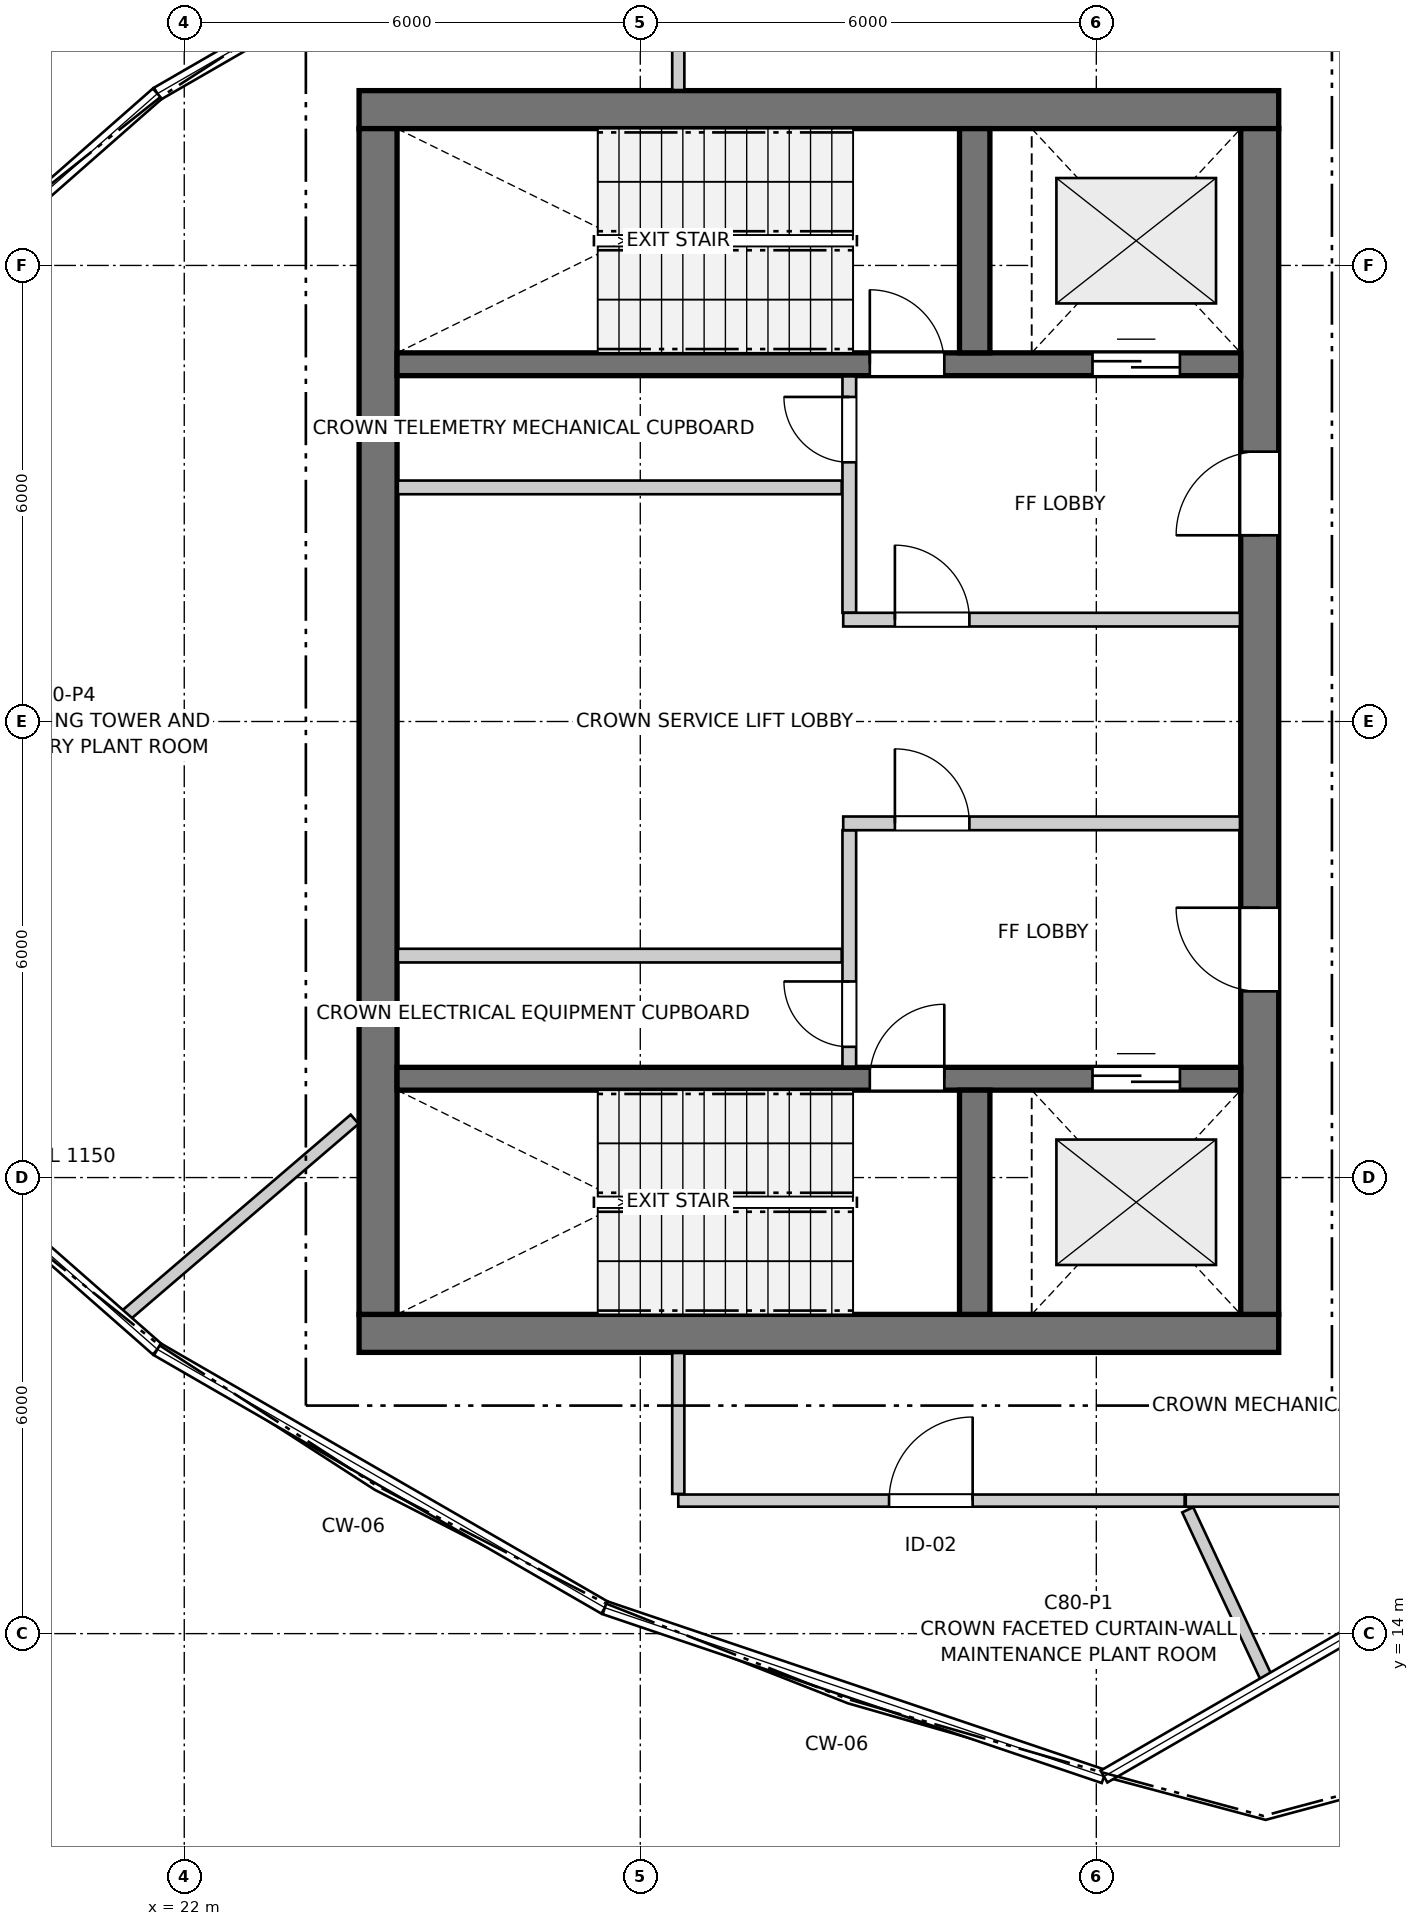
"""IFC4 building model, lengths in metres.
Left out: names, types, materials, properties, quantities, classifications, styles, units other than length and angle.
Written with IfcOpenShell. Run it as: python <this file> out.ifc"""

import sys

from ifc_helpers import new_model, si_unit, direction, frame, frame_2d, origin, place, context, subcontext, project, spatial, rectangle, extrude, source, transform, mapped, element, fill, save


model = new_model("IFC4")
c1 = context("Model", 3, precision=1e-05, world=origin(), true_north=direction((0.0, 1.0)))
c2 = subcontext(c1, "Body", "Model", "MODEL_VIEW")
j1 = project(units=[si_unit("LENGTHUNIT", "METRE"), si_unit("PLANEANGLEUNIT", "RADIAN")], contexts=[c1])
p1 = place(None, origin())
s1 = spatial("IfcSite", under=j1, at=p1, CompositionType="ELEMENT")
p2 = place(p1, origin())
s2 = spatial("IfcBuilding", under=s1, at=p2, CompositionType="ELEMENT")
p3 = place(p2, frame((0.0, 0.0, 270.4)))
s3 = spatial("IfcBuildingStorey", under=s2, at=p3, CompositionType="ELEMENT", Elevation=270.4)
for number, where, z_axis, x_axis in (
    (1, (24.3, 17.95, 0.0), (0.0, 0.0, 1.0), (1.0, 0.0, 0.0)),
    (2, (36.4, 34.05, 0.0), (0.0, 0.0, 1.0), (-1.0, 0.0, 0.0)),
):
    element("IfcWall", number, at=place(p3, frame(where, z_axis=z_axis, x_axis=x_axis)), inside=s3, PredefinedType="SHEAR", context=c2, shape_type="SweptSolid", body=[
        extrude(rectangle(XDim=12.1, YDim=0.5, at=frame_2d((6.05, 0.0))), origin(), (0.0, 0.0, 1.0), 4.05),
    ])
p4 = place(p3, frame((24.55, 33.8, 0.0), z_axis=(0.0, 0.0, 1.0), x_axis=(0.0, -1.0, 0.0)))
e3 = element("IfcWall", 3, at=p4, inside=s3, PredefinedType="SHEAR", context=c2, shape_type="SweptSolid", body=[
    extrude(rectangle(XDim=15.6, YDim=0.5, at=frame_2d((7.8, 0.0))), origin(), (0.0, 0.0, 1.0), 4.05),
])
p5 = place(p3, frame((36.15, 18.2, 0.0), z_axis=(0.0, 0.0, 1.0), x_axis=(0.0, 1.0, 0.0)))
e4 = element("IfcWall", 4, at=p5, inside=s3, PredefinedType="SHEAR", context=c2, shape_type="SweptSolid", body=[
    extrude(rectangle(XDim=15.6, YDim=0.5, at=frame_2d((7.8, 0.0))), origin(), (0.0, 0.0, 1.0), 4.05),
])
p6 = place(p5, frame((4.25, 0.0, 0.0)))
e5 = element("IfcOpeningElement", 5, at=p6, cuts=e4, PredefinedType="OPENING", context=c2, shape_type="SweptSolid", body=[
    extrude(rectangle(XDim=1.1, YDim=2.15, at=frame_2d((0.55, 1.075))), frame((0.0, 0.26, 0.0), z_axis=(0.0, -1.0, 0.0), x_axis=(1.0, 0.0, 0.0)), (0.0, 0.0, 1.0), 0.52),
])
p7 = place(p5, frame((10.25, 0.0, 0.0)))
e6 = element("IfcOpeningElement", 6, at=p7, cuts=e4, PredefinedType="OPENING", context=c2, shape_type="SweptSolid", body=[
    extrude(rectangle(XDim=1.1, YDim=2.15, at=frame_2d((0.55, 1.075))), frame((0.0, 0.26, 0.0), z_axis=(0.0, -1.0, 0.0), x_axis=(1.0, 0.0, 0.0)), (0.0, 0.0, 1.0), 0.52),
])
p8 = place(p3, frame((24.8, 21.3, 0.0), z_axis=(0.0, 0.0, 1.0), x_axis=(1.0, 0.0, 0.0)))
e7 = element("IfcWall", 7, at=p8, inside=s3, PredefinedType="SHEAR", context=c2, shape_type="SweptSolid", body=[
    extrude(rectangle(XDim=11.1, YDim=0.3, at=frame_2d((5.55, 0.0))), origin(), (0.0, 0.0, 1.0), 4.05),
])
p9 = place(p8, frame((6.22, 0.0, 0.0)))
e8 = element("IfcOpeningElement", 8, at=p9, cuts=e7, PredefinedType="OPENING", context=c2, shape_type="SweptSolid", body=[
    extrude(rectangle(XDim=0.98, YDim=2.15, at=frame_2d((0.49, 1.075))), frame((0.0, 0.16, 0.0), z_axis=(0.0, -1.0, 0.0), x_axis=(1.0, 0.0, 0.0)), (0.0, 0.0, 1.0), 0.32),
])
p10 = place(p8, frame((9.15, 0.0, 0.0)))
e9 = element("IfcOpeningElement", 9, at=p10, cuts=e7, PredefinedType="OPENING", context=c2, shape_type="SweptSolid", body=[
    extrude(rectangle(XDim=1.15, YDim=2.15, at=frame_2d((0.575, 1.075))), frame((0.0, 0.16, 0.0), z_axis=(0.0, -1.0, 0.0), x_axis=(1.0, 0.0, 0.0)), (0.0, 0.0, 1.0), 0.32),
])
p11 = place(p3, frame((32.4, 18.2, 0.0), z_axis=(0.0, 0.0, 1.0), x_axis=(0.0, 1.0, 0.0)))
e10 = element("IfcWall", 10, at=p11, inside=s3, PredefinedType="SHEAR", context=c2, shape_type="SweptSolid", body=[
    extrude(rectangle(XDim=2.95, YDim=0.4, at=frame_2d((1.475, 0.0))), origin(), (0.0, 0.0, 1.0), 4.05),
])
p12 = place(p3, frame((24.8, 30.7, 0.0), z_axis=(0.0, 0.0, 1.0), x_axis=(1.0, 0.0, 0.0)))
e11 = element("IfcWall", 11, at=p12, inside=s3, PredefinedType="SHEAR", context=c2, shape_type="SweptSolid", body=[
    extrude(rectangle(XDim=11.1, YDim=0.3, at=frame_2d((5.55, 0.0))), origin(), (0.0, 0.0, 1.0), 4.05),
])
p13 = place(p12, frame((6.22, 0.0, 0.0)))
e12 = element("IfcOpeningElement", 12, at=p13, cuts=e11, PredefinedType="OPENING", context=c2, shape_type="SweptSolid", body=[
    extrude(rectangle(XDim=0.98, YDim=2.15, at=frame_2d((0.49, 1.075))), frame((0.0, 0.16, 0.0), z_axis=(0.0, -1.0, 0.0), x_axis=(1.0, 0.0, 0.0)), (0.0, 0.0, 1.0), 0.32),
])
p14 = place(p12, frame((9.15, 0.0, 0.0)))
e13 = element("IfcOpeningElement", 13, at=p14, cuts=e11, PredefinedType="OPENING", context=c2, shape_type="SweptSolid", body=[
    extrude(rectangle(XDim=1.15, YDim=2.15, at=frame_2d((0.575, 1.075))), frame((0.0, 0.16, 0.0), z_axis=(0.0, -1.0, 0.0), x_axis=(1.0, 0.0, 0.0)), (0.0, 0.0, 1.0), 0.32),
])
p15 = place(p3, frame((32.4, 30.85, 0.0), z_axis=(0.0, 0.0, 1.0), x_axis=(0.0, 1.0, 0.0)))
e14 = element("IfcWall", 14, at=p15, inside=s3, PredefinedType="SHEAR", context=c2, shape_type="SweptSolid", body=[
    extrude(rectangle(XDim=2.95, YDim=0.4, at=frame_2d((1.475, 0.0))), origin(), (0.0, 0.0, 1.0), 4.05),
])
p16 = place(p3, frame((30.75, 21.46, 0.0), z_axis=(0.0, 0.0, 1.0), x_axis=(0.0, 1.0, 0.0)))
e15 = element("IfcWall", 15, at=p16, inside=s3, PredefinedType="PARTITIONING", context=c2, shape_type="SweptSolid", body=[
    extrude(rectangle(XDim=3.11, YDim=0.18, at=frame_2d((1.555, 0.0))), origin(), (0.0, 0.0, 1.0), 4.05),
])
p17 = place(p16, frame((0.26, 0.0, 0.0)))
e16 = element("IfcOpeningElement", 16, at=p17, cuts=e15, PredefinedType="OPENING", context=c2, shape_type="SweptSolid", body=[
    extrude(rectangle(XDim=0.86, YDim=2.05, at=frame_2d((0.43, 1.025))), frame((0.0, 0.1, 0.0), z_axis=(0.0, -1.0, 0.0), x_axis=(1.0, 0.0, 0.0)), (0.0, 0.0, 1.0), 0.2),
])
p18 = place(p3, frame((30.67, 24.66, 0.0), z_axis=(0.0, 0.0, 1.0), x_axis=(1.0, 0.0, 0.0)))
e17 = element("IfcWall", 17, at=p18, inside=s3, PredefinedType="PARTITIONING", context=c2, shape_type="SweptSolid", body=[
    extrude(rectangle(XDim=5.22, YDim=0.18, at=frame_2d((2.61, 0.0))), origin(), (0.0, 0.0, 1.0), 4.05),
])
p19 = place(p18, frame((0.68, 0.0, 0.0)))
e18 = element("IfcOpeningElement", 18, at=p19, cuts=e17, PredefinedType="OPENING", context=c2, shape_type="SweptSolid", body=[
    extrude(rectangle(XDim=0.98, YDim=2.15, at=frame_2d((0.49, 1.075))), frame((0.0, 0.1, 0.0), z_axis=(0.0, -1.0, 0.0), x_axis=(1.0, 0.0, 0.0)), (0.0, 0.0, 1.0), 0.2),
])
p20 = place(p3, frame((30.75, 27.43, 0.0), z_axis=(0.0, 0.0, 1.0), x_axis=(0.0, 1.0, 0.0)))
e19 = element("IfcWall", 19, at=p20, inside=s3, PredefinedType="PARTITIONING", context=c2, shape_type="SweptSolid", body=[
    extrude(rectangle(XDim=3.11, YDim=0.18, at=frame_2d((1.555, 0.0))), origin(), (0.0, 0.0, 1.0), 4.05),
])
p21 = place(p20, frame((1.98, 0.0, 0.0)))
e20 = element("IfcOpeningElement", 20, at=p21, cuts=e19, PredefinedType="OPENING", context=c2, shape_type="SweptSolid", body=[
    extrude(rectangle(XDim=0.86, YDim=2.05, at=frame_2d((0.43, 1.025))), frame((0.0, 0.1, 0.0), z_axis=(0.0, -1.0, 0.0), x_axis=(1.0, 0.0, 0.0)), (0.0, 0.0, 1.0), 0.2),
])
p22 = place(p3, frame((30.67, 27.34, 0.0), z_axis=(0.0, 0.0, 1.0), x_axis=(1.0, 0.0, 0.0)))
e21 = element("IfcWall", 21, at=p22, inside=s3, PredefinedType="PARTITIONING", context=c2, shape_type="SweptSolid", body=[
    extrude(rectangle(XDim=5.22, YDim=0.18, at=frame_2d((2.61, 0.0))), origin(), (0.0, 0.0, 1.0), 4.05),
])
p23 = place(p22, frame((0.68, 0.0, 0.0)))
e22 = element("IfcOpeningElement", 22, at=p23, cuts=e21, PredefinedType="OPENING", context=c2, shape_type="SweptSolid", body=[
    extrude(rectangle(XDim=0.98, YDim=2.15, at=frame_2d((0.49, 1.075))), frame((0.0, 0.1, 0.0), z_axis=(0.0, -1.0, 0.0), x_axis=(1.0, 0.0, 0.0)), (0.0, 0.0, 1.0), 0.2),
])
for number, where, z_axis, x_axis in (
    (23, (24.81, 22.92, 0.0), (0.0, 0.0, 1.0), (1.0, 0.0, 0.0)),
    (24, (24.81, 29.08, 0.0), (0.0, 0.0, 1.0), (1.0, 0.0, 0.0)),
):
    element("IfcWall", number, at=place(p3, frame(where, z_axis=z_axis, x_axis=x_axis)), inside=s3, PredefinedType="PARTITIONING", context=c2, shape_type="SweptSolid", body=[
        extrude(rectangle(XDim=5.84, YDim=0.18, at=frame_2d((2.92, 0.0))), origin(), (0.0, 0.0, 1.0), 4.05),
    ])
p24 = place(p3, frame((28.5, 15.75, 0.0), z_axis=(0.0, 0.0, 1.0), x_axis=(1.0, 0.0, 0.0)))
e25 = element("IfcWall", 25, at=p24, inside=s3, PredefinedType="PARTITIONING", context=c2, shape_type="SweptSolid", body=[
    extrude(rectangle(XDim=6.662, YDim=0.16, at=frame_2d((3.331, 0.0))), origin(), (0.0, 0.0, 1.0), 4.05),
])
p25 = place(p24, frame((2.773, 0.0, 0.0)))
e26 = element("IfcOpeningElement", 26, at=p25, cuts=e25, PredefinedType="OPENING", context=c2, shape_type="SweptSolid", body=[
    extrude(rectangle(XDim=1.1, YDim=2.15, at=frame_2d((0.55, 1.075))), frame((0.0, 0.09, 0.0), z_axis=(0.0, -1.0, 0.0), x_axis=(1.0, 0.0, 0.0)), (0.0, 0.0, 1.0), 0.18),
])
p26 = place(p3, frame((21.204, 18.164, 0.0), z_axis=(0.0, 0.0, 1.0), x_axis=(0.759364296086, 0.650665709739, 0.0)))
e27 = element("IfcWall", 27, at=p26, inside=s3, PredefinedType="PARTITIONING", context=c2, shape_type="SweptSolid", body=[
    extrude(rectangle(XDim=4.0, YDim=0.16, at=frame_2d((2.0, 0.0))), origin(), (0.0, 0.0, 1.0), 4.05),
])
p27 = place(p3, frame((35.177, 15.75, 0.0), z_axis=(0.0, 0.0, 1.0), x_axis=(1.0, 0.0, 0.0)))
e28 = element("IfcWall", 28, at=p27, inside=s3, PredefinedType="PARTITIONING", context=c2, shape_type="SweptSolid", body=[
    extrude(rectangle(XDim=3.385, YDim=0.16, at=frame_2d((1.692, 0.0))), origin(), (0.0, 0.0, 1.0), 4.05),
])
p28 = place(p3, frame((35.203, 15.629, 0.0), z_axis=(0.0, 0.0, 1.0), x_axis=(0.423577860937, -0.905859699801, 0.0)))
e29 = element("IfcWall", 29, at=p28, inside=s3, PredefinedType="PARTITIONING", context=c2, shape_type="SweptSolid", body=[
    extrude(rectangle(XDim=2.47, YDim=0.16, at=frame_2d((1.235, 0.0))), origin(), (0.0, 0.0, 1.0), 4.05),
])
for number, where, z_axis, x_axis in (
    (30, (28.5, 34.308, 0.0), (0.0, 0.0, 1.0), (0.0, 1.0, 0.0)),
    (31, (28.5, 15.838, 0.0), (0.0, 0.0, 1.0), (0.0, 1.0, 0.0)),
):
    element("IfcWall", number, at=place(p3, frame(where, z_axis=z_axis, x_axis=x_axis)), inside=s3, PredefinedType="PARTITIONING", context=c2, shape_type="SweptSolid", body=[
        extrude(rectangle(XDim=1.854, YDim=0.16, at=frame_2d((0.927, 0.0))), origin(), (0.0, 0.0, 1.0), 3.318),
    ])
m1 = source(origin(), c2, "Body", "SweptSolid", [
    extrude(rectangle(XDim=0.98, YDim=2.15, at=frame_2d((0.49, 1.075))), frame((0.0, 0.025, 0.0), z_axis=(0.0, -1.0, 0.0), x_axis=(1.0, 0.0, 0.0)), (0.0, 0.0, 1.0), 0.05),
])
p29 = place(p9, origin())
e32 = element("IfcDoor", 32, at=p29, inside=s3, OperationType="SINGLE_SWING_RIGHT", PredefinedType="DOOR", context=c2, shape_type="MappedRepresentation", body=[
    mapped(m1, transform((0.0, 0.0, 0.0), x_axis=(1.0, 0.0, 0.0), y_axis=(0.0, 1.0, 0.0), z_axis=(0.0, 0.0, 1.0), scale=1.0)),
])
fill(e8, e32)
m2 = source(origin(), c2, "Body", "SweptSolid", [
    extrude(rectangle(XDim=1.15, YDim=2.15, at=frame_2d((0.575, 1.075))), frame((0.0, 0.025, 0.0), z_axis=(0.0, -1.0, 0.0), x_axis=(1.0, 0.0, 0.0)), (0.0, 0.0, 1.0), 0.05),
])
p30 = place(p10, origin())
e33 = element("IfcDoor", 33, at=p30, inside=s3, OperationType="DOUBLE_DOOR_SLIDING", PredefinedType="DOOR", context=c2, shape_type="MappedRepresentation", body=[
    mapped(m2, transform((0.0, 0.0, 0.0), x_axis=(1.0, 0.0, 0.0), y_axis=(0.0, 1.0, 0.0), z_axis=(0.0, 0.0, 1.0), scale=1.0)),
])
fill(e9, e33)
p31 = place(p13, origin())
e34 = element("IfcDoor", 34, at=p31, inside=s3, OperationType="SINGLE_SWING_LEFT", PredefinedType="DOOR", context=c2, shape_type="MappedRepresentation", body=[
    mapped(m1, transform((0.0, 0.0, 0.0), x_axis=(1.0, 0.0, 0.0), y_axis=(0.0, 1.0, 0.0), z_axis=(0.0, 0.0, 1.0), scale=1.0)),
])
fill(e12, e34)
p32 = place(p14, origin())
e35 = element("IfcDoor", 35, at=p32, inside=s3, OperationType="DOUBLE_DOOR_SLIDING", PredefinedType="DOOR", context=c2, shape_type="MappedRepresentation", body=[
    mapped(m2, transform((0.0, 0.0, 0.0), x_axis=(1.0, 0.0, 0.0), y_axis=(0.0, 1.0, 0.0), z_axis=(0.0, 0.0, 1.0), scale=1.0)),
])
fill(e13, e35)
m3 = source(origin(), c2, "Body", "SweptSolid", [
    extrude(rectangle(XDim=1.1, YDim=2.15, at=frame_2d((0.55, 1.075))), frame((0.0, 0.025, 0.0), z_axis=(0.0, -1.0, 0.0), x_axis=(1.0, 0.0, 0.0)), (0.0, 0.0, 1.0), 0.05),
])
p33 = place(p6, origin())
e36 = element("IfcDoor", 36, at=p33, inside=s3, OperationType="SINGLE_SWING_RIGHT", PredefinedType="DOOR", context=c2, shape_type="MappedRepresentation", body=[
    mapped(m3, transform((0.0, 0.0, 0.0), x_axis=(1.0, 0.0, 0.0), y_axis=(0.0, 1.0, 0.0), z_axis=(0.0, 0.0, 1.0), scale=1.0)),
])
fill(e5, e36)
p34 = place(p7, origin())
e37 = element("IfcDoor", 37, at=p34, inside=s3, OperationType="SINGLE_SWING_LEFT", PredefinedType="DOOR", context=c2, shape_type="MappedRepresentation", body=[
    mapped(m3, transform((0.0, 0.0, 0.0), x_axis=(1.0, 0.0, 0.0), y_axis=(0.0, 1.0, 0.0), z_axis=(0.0, 0.0, 1.0), scale=1.0)),
])
fill(e6, e37)
m4 = source(origin(), c2, "Body", "SweptSolid", [
    extrude(rectangle(XDim=0.86, YDim=2.05, at=frame_2d((0.43, 1.025))), frame((0.0, 0.025, 0.0), z_axis=(0.0, -1.0, 0.0), x_axis=(1.0, 0.0, 0.0)), (0.0, 0.0, 1.0), 0.05),
])
p35 = place(p17, origin())
e38 = element("IfcDoor", 38, at=p35, inside=s3, OperationType="SINGLE_SWING_RIGHT", PredefinedType="DOOR", context=c2, shape_type="MappedRepresentation", body=[
    mapped(m4, transform((0.0, 0.0, 0.0), x_axis=(1.0, 0.0, 0.0), y_axis=(0.0, 1.0, 0.0), z_axis=(0.0, 0.0, 1.0), scale=1.0)),
])
fill(e16, e38)
p36 = place(p19, origin())
e39 = element("IfcDoor", 39, at=p36, inside=s3, OperationType="SINGLE_SWING_LEFT", PredefinedType="DOOR", context=c2, shape_type="MappedRepresentation", body=[
    mapped(m1, transform((0.0, 0.0, 0.0), x_axis=(1.0, 0.0, 0.0), y_axis=(0.0, 1.0, 0.0), z_axis=(0.0, 0.0, 1.0), scale=1.0)),
])
fill(e18, e39)
p37 = place(p21, origin())
e40 = element("IfcDoor", 40, at=p37, inside=s3, OperationType="SINGLE_SWING_RIGHT", PredefinedType="DOOR", context=c2, shape_type="MappedRepresentation", body=[
    mapped(m4, transform((0.0, 0.0, 0.0), x_axis=(1.0, 0.0, 0.0), y_axis=(0.0, 1.0, 0.0), z_axis=(0.0, 0.0, 1.0), scale=1.0)),
])
fill(e20, e40)
p38 = place(p23, origin())
e41 = element("IfcDoor", 41, at=p38, inside=s3, OperationType="SINGLE_SWING_LEFT", PredefinedType="DOOR", context=c2, shape_type="MappedRepresentation", body=[
    mapped(m1, transform((0.0, 0.0, 0.0), x_axis=(1.0, 0.0, 0.0), y_axis=(0.0, 1.0, 0.0), z_axis=(0.0, 0.0, 1.0), scale=1.0)),
])
fill(e22, e41)
p39 = place(p25, origin())
e42 = element("IfcDoor", 42, at=p39, inside=s3, OperationType="SINGLE_SWING_RIGHT", PredefinedType="DOOR", context=c2, shape_type="MappedRepresentation", body=[
    mapped(m3, transform((0.0, 0.0, 0.0), x_axis=(1.0, 0.0, 0.0), y_axis=(0.0, 1.0, 0.0), z_axis=(0.0, 0.0, 1.0), scale=1.0)),
])
fill(e26, e42)
save(model, sys.argv[1])
